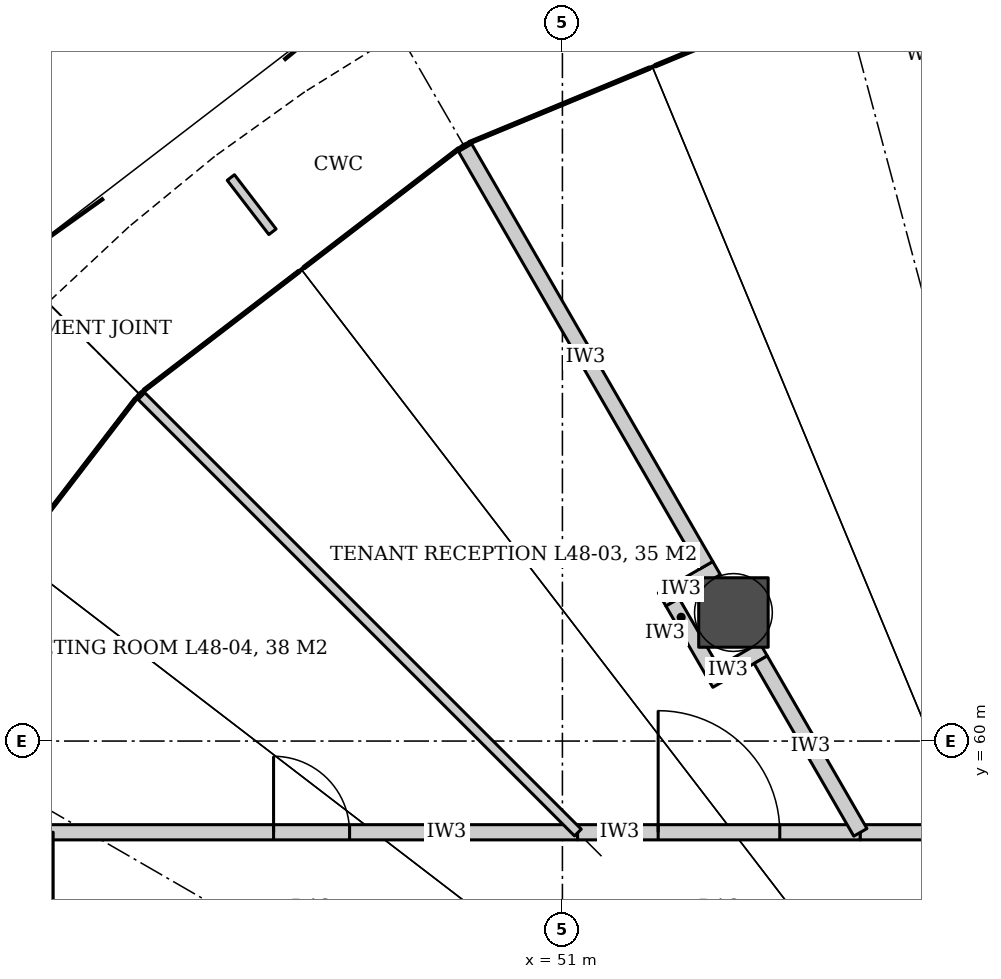
"""IFC4 building model, lengths in metres.
Left out: names, types, materials, properties, quantities, classifications, styles, units other than length and angle.
Written with IfcOpenShell. Run it as: python <this file> out.ifc"""

import sys

from ifc_helpers import new_model, si_unit, direction, frame, frame_2d, origin, origin_2d, place, context, subcontext, project, spatial, rectangle, hollow_circle, extrude, element, fill, save


model = new_model("IFC4")
c1 = context("Model", 3, precision=1e-05, world=origin(), true_north=direction((0.0, 1.0)))
c2 = subcontext(c1, "Body", "Model", "MODEL_VIEW")
j1 = project(units=[si_unit("LENGTHUNIT", "METRE"), si_unit("PLANEANGLEUNIT", "RADIAN")], contexts=[c1])
p1 = place(None, origin())
s1 = spatial("IfcSite", under=j1, at=p1, CompositionType="ELEMENT")
p2 = place(p1, origin())
s2 = spatial("IfcBuilding", under=s1, at=p2, CompositionType="ELEMENT")
p3 = place(p2, frame((0.0, 0.0, 202.4)))
s3 = spatial("IfcBuildingStorey", under=s2, at=p3, CompositionType="ELEMENT", Elevation=202.4)
p4 = place(p3, frame((53.25, 61.691, 0.0), z_axis=(0.0, 0.0, 1.0), x_axis=(1.0, 0.0, 0.0)))
e1 = element("IfcColumn", 1, at=p4, inside=s3, PredefinedType="COLUMN", context=c2, shape_type="SweptSolid", body=[
    extrude(hollow_circle(Radius=0.457, WallThickness=0.045, at=origin_2d()), origin(), (0.0, 0.0, 1.0), 4.2),
])
p5 = place(p3, frame((44.2, 58.8, 0.0), z_axis=(0.0, 0.0, 1.0), x_axis=(1.0, 0.0, 0.0)))
e2 = element("IfcWall", 2, at=p5, inside=s3, PredefinedType="PARTITIONING", context=c2, shape_type="SweptSolid", body=[
    extrude(rectangle(XDim=7.0, YDim=0.2, at=frame_2d((3.5, 0.0))), origin(), (0.0, 0.0, 1.0), 3.012),
])
p6 = place(p5, frame((3.0, 0.0, 0.0)))
e3 = element("IfcOpeningElement", 3, at=p6, cuts=e2, PredefinedType="OPENING", context=c2, shape_type="SweptSolid", body=[
    extrude(rectangle(XDim=1.0, YDim=2.4, at=frame_2d((0.5, 1.2))), frame((0.0, 0.11, 0.0), z_axis=(0.0, -1.0, 0.0), x_axis=(1.0, 0.0, 0.0)), (0.0, 0.0, 1.0), 0.22),
])
p7 = place(p3, frame((51.2, 58.8, 0.0), z_axis=(0.0, 0.0, 1.0), x_axis=(1.0, 0.0, 0.0)))
e4 = element("IfcWall", 4, at=p7, inside=s3, PredefinedType="PARTITIONING", context=c2, shape_type="SweptSolid", body=[
    extrude(rectangle(XDim=3.719, YDim=0.2, at=frame_2d((1.86, 0.0))), origin(), (0.0, 0.0, 1.0), 3.04),
])
p8 = place(p7, frame((1.06, 0.0, 0.0)))
e5 = element("IfcOpeningElement", 5, at=p8, cuts=e4, PredefinedType="OPENING", context=c2, shape_type="SweptSolid", body=[
    extrude(rectangle(XDim=1.6, YDim=2.4, at=frame_2d((0.8, 1.2))), frame((0.0, 0.11, 0.0), z_axis=(0.0, -1.0, 0.0), x_axis=(1.0, 0.0, 0.0)), (0.0, 0.0, 1.0), 0.22),
])
p9 = place(p3, frame((54.919, 58.8, 0.0), z_axis=(0.0, 0.0, 1.0), x_axis=(1.0, 0.0, 0.0)))
e6 = element("IfcWall", 6, at=p9, inside=s3, PredefinedType="PARTITIONING", context=c2, shape_type="SweptSolid", body=[
    extrude(rectangle(XDim=20.881, YDim=0.2, at=frame_2d((10.44, 0.0))), origin(), (0.0, 0.0, 1.0), 3.012),
])
p10 = place(p9, frame((9.44, 0.0, 0.0)))
e7 = element("IfcOpeningElement", 7, at=p10, cuts=e6, PredefinedType="OPENING", context=c2, shape_type="SweptSolid", body=[
    extrude(rectangle(XDim=2.0, YDim=2.1, at=frame_2d((1.0, 1.05))), frame((0.0, 0.11, 0.0), z_axis=(0.0, -1.0, 0.0), x_axis=(1.0, 0.0, 0.0)), (0.0, 0.0, 1.0), 0.22),
])
p11 = place(p3, frame((44.2, 54.234, 0.0), z_axis=(0.0, 0.0, 1.0), x_axis=(0.0, 1.0, 0.0)))
e8 = element("IfcWall", 8, at=p11, inside=s3, PredefinedType="PARTITIONING", context=c2, shape_type="SweptSolid", body=[
    extrude(rectangle(XDim=4.566, YDim=0.2, at=frame_2d((2.283, 0.0))), origin(), (0.0, 0.0, 1.0), 3.012),
])
for number, where, z_axis, x_axis in (
    (9, (53.472, 61.107, 0.0), (0.0, 0.0, 1.0), (0.866, 0.5, 0.0)),
    (10, (52.855, 62.176, 0.0), (0.0, 0.0, 1.0), (0.866, 0.5, 0.0)),
):
    element("IfcWall", number, at=place(p3, frame(where, z_axis=z_axis, x_axis=x_axis)), inside=s3, PredefinedType="PARTITIONING", context=c2, shape_type="SweptSolid", body=[
        extrude(rectangle(XDim=0.827, YDim=0.2, at=frame_2d((0.414, 0.0))), origin(), (0.0, 0.0, 1.0), 3.012),
    ])
p12 = place(p3, frame((54.052, 61.557, 0.0), z_axis=(0.0, 0.0, 1.0), x_axis=(-0.500049439734, 0.865996857859, 0.0)))
e11 = element("IfcWall", 11, at=p12, inside=s3, PredefinedType="PARTITIONING", context=c2, shape_type="SweptSolid", body=[
    extrude(rectangle(XDim=1.034, YDim=0.2, at=frame_2d((0.517, 0.0))), origin(), (0.0, 0.0, 1.0), 3.012),
])
p13 = place(p3, frame((54.92, 58.799, 0.0), z_axis=(0.0, 0.0, 1.0), x_axis=(-0.500023253097, 0.866011978186, 0.0)))
e12 = element("IfcWall", 12, at=p13, inside=s3, PredefinedType="PARTITIONING", context=c2, shape_type="SweptSolid", body=[
    extrude(rectangle(XDim=2.623, YDim=0.2, at=frame_2d((1.312, 0.0))), origin(), (0.0, 0.0, 1.0), 3.04),
])
p14 = place(p3, frame((52.892, 62.312, 0.0), z_axis=(0.0, 0.0, 1.0), x_axis=(-0.500011609405, 0.866018700987, 0.0)))
e13 = element("IfcWall", 13, at=p14, inside=s3, PredefinedType="PARTITIONING", context=c2, shape_type="SweptSolid", body=[
    extrude(rectangle(XDim=6.943, YDim=0.2, at=frame_2d((3.472, 0.0))), origin(), (0.0, 0.0, 1.0), 3.012),
])
p15 = place(p3, frame((51.204, 58.796, 0.0), z_axis=(0.0, 0.0, 1.0), x_axis=(-0.707106781187, 0.707106781187, 0.0)))
e14 = element("IfcWall", 14, at=p15, inside=s3, PredefinedType="PARTITIONING", context=c2, shape_type="SweptSolid", body=[
    extrude(rectangle(XDim=8.72, YDim=0.125, at=frame_2d((4.36, 0.0))), origin(), (0.0, 0.0, 1.0), 3.012),
])
p16 = place(p8, origin())
e15 = element("IfcDoor", 15, at=p16, inside=s3, OperationType="DOUBLE_DOOR_DOUBLE_SWING", PredefinedType="DOOR", context=c2, shape_type="SweptSolid", body=[
    extrude(rectangle(XDim=1.6, YDim=2.4, at=frame_2d((0.8, 1.2))), frame((0.0, 0.025, 0.0), z_axis=(0.0, -1.0, 0.0), x_axis=(1.0, 0.0, 0.0)), (0.0, 0.0, 1.0), 0.05),
])
fill(e5, e15)
p17 = place(p6, origin())
e16 = element("IfcDoor", 16, at=p17, inside=s3, OperationType="SINGLE_SWING_LEFT", PredefinedType="DOOR", context=c2, shape_type="SweptSolid", body=[
    extrude(rectangle(XDim=1.0, YDim=2.4, at=frame_2d((0.5, 1.2))), frame((0.0, 0.025, 0.0), z_axis=(0.0, -1.0, 0.0), x_axis=(1.0, 0.0, 0.0)), (0.0, 0.0, 1.0), 0.05),
])
fill(e3, e16)
save(model, sys.argv[1])
